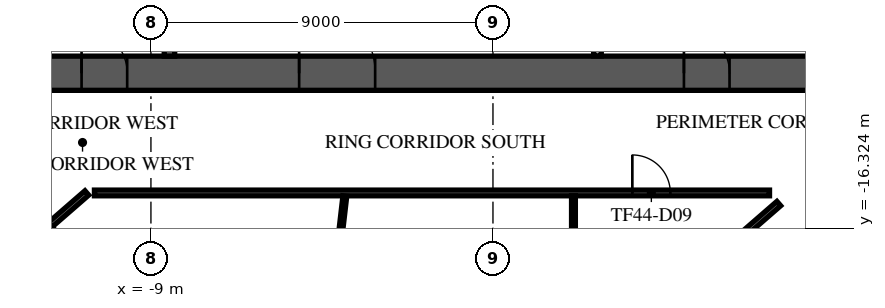
"""IFC4 building model, lengths in metres.
Left out: names, types, materials, properties, quantities, classifications, styles, units other than length and angle.
Written with IfcOpenShell. Run it as: python <this file> out.ifc"""

import sys

from ifc_helpers import new_model, si_unit, direction, frame, frame_2d, origin, place, context, subcontext, project, spatial, rectangle, extrude, element, fill, save


model = new_model("IFC4")
c1 = context("Model", 3, precision=1e-05, world=origin(), true_north=direction((0.0, 1.0)))
c2 = subcontext(c1, "Body", "Model", "MODEL_VIEW")
j1 = project(units=[si_unit("LENGTHUNIT", "METRE"), si_unit("PLANEANGLEUNIT", "RADIAN")], contexts=[c1])
p1 = place(None, origin())
s1 = spatial("IfcSite", under=j1, at=p1, CompositionType="ELEMENT")
p2 = place(p1, origin())
s2 = spatial("IfcBuilding", under=s1, at=p2, CompositionType="ELEMENT")
p3 = place(p2, frame((0.0, 0.0, 193.3)))
s3 = spatial("IfcBuildingStorey", under=s2, at=p3, CompositionType="ELEMENT", Elevation=193.3)
p4 = place(p3, frame((-12.7, -12.25, 0.0), z_axis=(0.0, 0.0, 1.0), x_axis=(1.0, 0.0, 0.0)))
e1 = element("IfcWall", 1, at=p4, inside=s3, PredefinedType="SHEAR", context=c2, shape_type="SweptSolid", body=[
    extrude(rectangle(XDim=25.4, YDim=0.9, at=frame_2d((12.7, 0.0))), origin(), (0.0, 0.0, 1.0), 3.62),
])
p5 = place(p4, frame((7.6, 0.0, 0.0)))
e2 = element("IfcOpeningElement", 2, at=p5, cuts=e1, PredefinedType="OPENING", context=c2, shape_type="SweptSolid", body=[
    extrude(rectangle(XDim=2.0, YDim=2.1, at=frame_2d((1.0, 1.05))), frame((0.0, 0.46, 0.0), z_axis=(0.0, -1.0, 0.0), x_axis=(1.0, 0.0, 0.0)), (0.0, 0.0, 1.0), 0.92),
])
p6 = place(p4, frame((17.725, 0.0, 0.0)))
e3 = element("IfcOpeningElement", 3, at=p6, cuts=e1, PredefinedType="OPENING", context=c2, shape_type="SweptSolid", body=[
    extrude(rectangle(XDim=1.2, YDim=2.1, at=frame_2d((0.6, 1.05))), frame((0.0, 0.46, 0.0), z_axis=(0.0, -1.0, 0.0), x_axis=(1.0, 0.0, 0.0)), (0.0, 0.0, 1.0), 0.92),
])
p7 = place(p4, frame((1.875, 0.0, 0.0)))
e4 = element("IfcOpeningElement", 4, at=p7, cuts=e1, PredefinedType="OPENING", context=c2, shape_type="SweptSolid", body=[
    extrude(rectangle(XDim=1.2, YDim=2.1, at=frame_2d((0.6, 1.05))), frame((0.0, 0.46, 0.0), z_axis=(0.0, -1.0, 0.0), x_axis=(1.0, 0.0, 0.0)), (0.0, 0.0, 1.0), 0.92),
])
p8 = place(p4, frame((22.325, 0.0, 0.0)))
e5 = element("IfcOpeningElement", 5, at=p8, cuts=e1, PredefinedType="OPENING", context=c2, shape_type="SweptSolid", body=[
    extrude(rectangle(XDim=1.2, YDim=2.1, at=frame_2d((0.6, 1.05))), frame((0.0, 0.46, 0.0), z_axis=(0.0, -1.0, 0.0), x_axis=(1.0, 0.0, 0.0)), (0.0, 0.0, 1.0), 0.92),
])
p9 = place(p3, frame((-8.512, -4.55, 0.0), z_axis=(0.0, 0.0, 1.0), x_axis=(0.0, -1.0, 0.0)))
e6 = element("IfcWall", 6, at=p9, inside=s3, PredefinedType="SOLIDWALL", context=c2, shape_type="SweptSolid", body=[
    extrude(rectangle(XDim=7.25, YDim=0.275, at=frame_2d((3.625, 0.0))), origin(), (0.0, 0.0, 1.0), 3.62),
])
p10 = place(p9, frame((6.0, 0.0, 0.0)))
e7 = element("IfcOpeningElement", 7, at=p10, cuts=e6, PredefinedType="OPENING", context=c2, shape_type="SweptSolid", body=[
    extrude(rectangle(XDim=1.0, YDim=2.1, at=frame_2d((0.5, 1.05))), frame((0.0, 0.147, 0.0), z_axis=(0.0, -1.0, 0.0), x_axis=(1.0, 0.0, 0.0)), (0.0, 0.0, 1.0), 0.295),
])
p11 = place(p3, frame((2.75, -11.795, 0.0), z_axis=(0.0, 0.0, 1.0), x_axis=(0.0, 1.0, 0.0)))
e8 = element("IfcWall", 8, at=p11, inside=s3, PredefinedType="PARTITIONING", context=c2, shape_type="SweptSolid", body=[
    extrude(rectangle(XDim=2.99, YDim=0.2, at=frame_2d((1.495, 0.0))), origin(), (0.0, 0.0, 1.0), 3.62),
])
p12 = place(p3, frame((-35.208, -4.768, 0.0), z_axis=(0.0, 0.0, 1.0), x_axis=(0.656058749455, -0.754709823219, 0.0)))
e9 = element("IfcWall", 9, at=p12, inside=s3, PredefinedType="STANDARD", context=c2, shape_type="SweptSolid", body=[
    extrude(rectangle(XDim=39.0, YDim=0.6, at=frame_2d((19.5, 0.0))), origin(), (0.0, 0.0, 1.0), 3.62),
])
p13 = place(p12, frame((1.217, 0.0, 0.9)))
e10 = element("IfcOpeningElement", 10, at=p13, cuts=e9, PredefinedType="OPENING", context=c2, shape_type="SweptSolid", body=[
    extrude(rectangle(XDim=1.9, YDim=2.1, at=frame_2d((0.95, 1.05))), frame((0.0, 0.31, 0.0), z_axis=(0.0, -1.0, 0.0), x_axis=(1.0, 0.0, 0.0)), (0.0, 0.0, 1.0), 0.62),
])
p14 = place(p12, frame((5.55, 0.0, 0.9)))
e11 = element("IfcOpeningElement", 11, at=p14, cuts=e9, PredefinedType="OPENING", context=c2, shape_type="SweptSolid", body=[
    extrude(rectangle(XDim=1.9, YDim=2.1, at=frame_2d((0.95, 1.05))), frame((0.0, 0.31, 0.0), z_axis=(0.0, -1.0, 0.0), x_axis=(1.0, 0.0, 0.0)), (0.0, 0.0, 1.0), 0.62),
])
p15 = place(p12, frame((9.883, 0.0, 0.9)))
e12 = element("IfcOpeningElement", 12, at=p15, cuts=e9, PredefinedType="OPENING", context=c2, shape_type="SweptSolid", body=[
    extrude(rectangle(XDim=1.9, YDim=2.1, at=frame_2d((0.95, 1.05))), frame((0.0, 0.31, 0.0), z_axis=(0.0, -1.0, 0.0), x_axis=(1.0, 0.0, 0.0)), (0.0, 0.0, 1.0), 0.62),
])
p16 = place(p12, frame((14.217, 0.0, 0.9)))
e13 = element("IfcOpeningElement", 13, at=p16, cuts=e9, PredefinedType="OPENING", context=c2, shape_type="SweptSolid", body=[
    extrude(rectangle(XDim=1.9, YDim=2.1, at=frame_2d((0.95, 1.05))), frame((0.0, 0.31, 0.0), z_axis=(0.0, -1.0, 0.0), x_axis=(1.0, 0.0, 0.0)), (0.0, 0.0, 1.0), 0.62),
])
p17 = place(p12, frame((18.55, 0.0, 0.9)))
e14 = element("IfcOpeningElement", 14, at=p17, cuts=e9, PredefinedType="OPENING", context=c2, shape_type="SweptSolid", body=[
    extrude(rectangle(XDim=1.9, YDim=2.1, at=frame_2d((0.95, 1.05))), frame((0.0, 0.31, 0.0), z_axis=(0.0, -1.0, 0.0), x_axis=(1.0, 0.0, 0.0)), (0.0, 0.0, 1.0), 0.62),
])
p18 = place(p12, frame((22.883, 0.0, 0.9)))
e15 = element("IfcOpeningElement", 15, at=p18, cuts=e9, PredefinedType="OPENING", context=c2, shape_type="SweptSolid", body=[
    extrude(rectangle(XDim=1.9, YDim=2.1, at=frame_2d((0.95, 1.05))), frame((0.0, 0.31, 0.0), z_axis=(0.0, -1.0, 0.0), x_axis=(1.0, 0.0, 0.0)), (0.0, 0.0, 1.0), 0.62),
])
p19 = place(p12, frame((27.217, 0.0, 0.9)))
e16 = element("IfcOpeningElement", 16, at=p19, cuts=e9, PredefinedType="OPENING", context=c2, shape_type="SweptSolid", body=[
    extrude(rectangle(XDim=1.9, YDim=2.1, at=frame_2d((0.95, 1.05))), frame((0.0, 0.31, 0.0), z_axis=(0.0, -1.0, 0.0), x_axis=(1.0, 0.0, 0.0)), (0.0, 0.0, 1.0), 0.62),
])
p20 = place(p12, frame((31.55, 0.0, 0.9)))
e17 = element("IfcOpeningElement", 17, at=p20, cuts=e9, PredefinedType="OPENING", context=c2, shape_type="SweptSolid", body=[
    extrude(rectangle(XDim=1.9, YDim=2.1, at=frame_2d((0.95, 1.05))), frame((0.0, 0.31, 0.0), z_axis=(0.0, -1.0, 0.0), x_axis=(1.0, 0.0, 0.0)), (0.0, 0.0, 1.0), 0.62),
])
p21 = place(p12, frame((35.883, 0.0, 0.9)))
e18 = element("IfcOpeningElement", 18, at=p21, cuts=e9, PredefinedType="OPENING", context=c2, shape_type="SweptSolid", body=[
    extrude(rectangle(XDim=1.9, YDim=2.1, at=frame_2d((0.95, 1.05))), frame((0.0, 0.31, 0.0), z_axis=(0.0, -1.0, 0.0), x_axis=(1.0, 0.0, 0.0)), (0.0, 0.0, 1.0), 0.62),
])
p22 = place(p3, frame((-2.286, -34.715, 0.0), z_axis=(0.0, 0.0, 1.0), x_axis=(0.754708272811, 0.656060532993, 0.0)))
e19 = element("IfcWall", 19, at=p22, inside=s3, PredefinedType="STANDARD", context=c2, shape_type="SweptSolid", body=[
    extrude(rectangle(XDim=49.0, YDim=0.6, at=frame_2d((24.5, 0.0))), origin(), (0.0, 0.0, 1.0), 3.62),
])
p23 = place(p22, frame((1.227, 0.0, 0.9)))
e20 = element("IfcOpeningElement", 20, at=p23, cuts=e19, PredefinedType="OPENING", context=c2, shape_type="SweptSolid", body=[
    extrude(rectangle(XDim=2.0, YDim=2.1, at=frame_2d((1.0, 1.05))), frame((0.0, 0.31, 0.0), z_axis=(0.0, -1.0, 0.0), x_axis=(1.0, 0.0, 0.0)), (0.0, 0.0, 1.0), 0.62),
])
p24 = place(p22, frame((5.682, 0.0, 0.9)))
e21 = element("IfcOpeningElement", 21, at=p24, cuts=e19, PredefinedType="OPENING", context=c2, shape_type="SweptSolid", body=[
    extrude(rectangle(XDim=2.0, YDim=2.1, at=frame_2d((1.0, 1.05))), frame((0.0, 0.31, 0.0), z_axis=(0.0, -1.0, 0.0), x_axis=(1.0, 0.0, 0.0)), (0.0, 0.0, 1.0), 0.62),
])
p25 = place(p22, frame((10.136, 0.0, 0.9)))
e22 = element("IfcOpeningElement", 22, at=p25, cuts=e19, PredefinedType="OPENING", context=c2, shape_type="SweptSolid", body=[
    extrude(rectangle(XDim=2.0, YDim=2.1, at=frame_2d((1.0, 1.05))), frame((0.0, 0.31, 0.0), z_axis=(0.0, -1.0, 0.0), x_axis=(1.0, 0.0, 0.0)), (0.0, 0.0, 1.0), 0.62),
])
p26 = place(p22, frame((14.591, 0.0, 0.9)))
e23 = element("IfcOpeningElement", 23, at=p26, cuts=e19, PredefinedType="OPENING", context=c2, shape_type="SweptSolid", body=[
    extrude(rectangle(XDim=2.0, YDim=2.1, at=frame_2d((1.0, 1.05))), frame((0.0, 0.31, 0.0), z_axis=(0.0, -1.0, 0.0), x_axis=(1.0, 0.0, 0.0)), (0.0, 0.0, 1.0), 0.62),
])
p27 = place(p22, frame((19.045, 0.0, 0.9)))
e24 = element("IfcOpeningElement", 24, at=p27, cuts=e19, PredefinedType="OPENING", context=c2, shape_type="SweptSolid", body=[
    extrude(rectangle(XDim=2.0, YDim=2.1, at=frame_2d((1.0, 1.05))), frame((0.0, 0.31, 0.0), z_axis=(0.0, -1.0, 0.0), x_axis=(1.0, 0.0, 0.0)), (0.0, 0.0, 1.0), 0.62),
])
p28 = place(p22, frame((23.5, 0.0, 0.9)))
e25 = element("IfcOpeningElement", 25, at=p28, cuts=e19, PredefinedType="OPENING", context=c2, shape_type="SweptSolid", body=[
    extrude(rectangle(XDim=2.0, YDim=2.1, at=frame_2d((1.0, 1.05))), frame((0.0, 0.31, 0.0), z_axis=(0.0, -1.0, 0.0), x_axis=(1.0, 0.0, 0.0)), (0.0, 0.0, 1.0), 0.62),
])
p29 = place(p22, frame((27.955, 0.0, 0.9)))
e26 = element("IfcOpeningElement", 26, at=p29, cuts=e19, PredefinedType="OPENING", context=c2, shape_type="SweptSolid", body=[
    extrude(rectangle(XDim=2.0, YDim=2.1, at=frame_2d((1.0, 1.05))), frame((0.0, 0.31, 0.0), z_axis=(0.0, -1.0, 0.0), x_axis=(1.0, 0.0, 0.0)), (0.0, 0.0, 1.0), 0.62),
])
p30 = place(p22, frame((32.409, 0.0, 0.9)))
e27 = element("IfcOpeningElement", 27, at=p30, cuts=e19, PredefinedType="OPENING", context=c2, shape_type="SweptSolid", body=[
    extrude(rectangle(XDim=2.0, YDim=2.1, at=frame_2d((1.0, 1.05))), frame((0.0, 0.31, 0.0), z_axis=(0.0, -1.0, 0.0), x_axis=(1.0, 0.0, 0.0)), (0.0, 0.0, 1.0), 0.62),
])
p31 = place(p22, frame((36.864, 0.0, 0.9)))
e28 = element("IfcOpeningElement", 28, at=p31, cuts=e19, PredefinedType="OPENING", context=c2, shape_type="SweptSolid", body=[
    extrude(rectangle(XDim=2.0, YDim=2.1, at=frame_2d((1.0, 1.05))), frame((0.0, 0.31, 0.0), z_axis=(0.0, -1.0, 0.0), x_axis=(1.0, 0.0, 0.0)), (0.0, 0.0, 1.0), 0.62),
])
p32 = place(p22, frame((41.318, 0.0, 0.9)))
e29 = element("IfcOpeningElement", 29, at=p32, cuts=e19, PredefinedType="OPENING", context=c2, shape_type="SweptSolid", body=[
    extrude(rectangle(XDim=2.0, YDim=2.1, at=frame_2d((1.0, 1.05))), frame((0.0, 0.31, 0.0), z_axis=(0.0, -1.0, 0.0), x_axis=(1.0, 0.0, 0.0)), (0.0, 0.0, 1.0), 0.62),
])
p33 = place(p22, frame((45.773, 0.0, 0.9)))
e30 = element("IfcOpeningElement", 30, at=p33, cuts=e19, PredefinedType="OPENING", context=c2, shape_type="SweptSolid", body=[
    extrude(rectangle(XDim=2.0, YDim=2.1, at=frame_2d((1.0, 1.05))), frame((0.0, 0.31, 0.0), z_axis=(0.0, -1.0, 0.0), x_axis=(1.0, 0.0, 0.0)), (0.0, 0.0, 1.0), 0.62),
])
p34 = place(p3, frame((-24.98, -4.673, 0.0), z_axis=(0.0, 0.0, 1.0), x_axis=(0.656048444225, -0.754718781289, 0.0)))
e31 = element("IfcWall", 31, at=p34, inside=s3, PredefinedType="PARTITIONING", context=c2, shape_type="SweptSolid", body=[
    extrude(rectangle(XDim=25.8, YDim=0.15, at=frame_2d((12.9, 0.0))), origin(), (0.0, 0.0, 1.0), 3.17),
])
p35 = place(p34, frame((12.071, 0.0, 0.0)))
e32 = element("IfcOpeningElement", 32, at=p35, cuts=e31, PredefinedType="OPENING", context=c2, shape_type="SweptSolid", body=[
    extrude(rectangle(XDim=1.0, YDim=2.1, at=frame_2d((0.5, 1.05))), frame((0.0, 0.085, 0.0), z_axis=(0.0, -1.0, 0.0), x_axis=(1.0, 0.0, 0.0)), (0.0, 0.0, 1.0), 0.17),
])
p36 = place(p34, frame((24.318, 0.0, 0.0)))
e33 = element("IfcOpeningElement", 33, at=p36, cuts=e31, PredefinedType="OPENING", context=c2, shape_type="SweptSolid", body=[
    extrude(rectangle(XDim=1.0, YDim=2.1, at=frame_2d((0.5, 1.05))), frame((0.0, 0.085, 0.0), z_axis=(0.0, -1.0, 0.0), x_axis=(1.0, 0.0, 0.0)), (0.0, 0.0, 1.0), 0.17),
])
p37 = place(p3, frame((-11.705, -16.285, 0.0), z_axis=(0.0, 0.0, 1.0), x_axis=(0.656018266208, -0.754745012837, 0.0)))
e34 = element("IfcWall", 34, at=p37, inside=s3, PredefinedType="PARTITIONING", context=c2, shape_type="SweptSolid", body=[
    extrude(rectangle(XDim=8.326, YDim=0.15, at=frame_2d((4.163, 0.0))), origin(), (0.0, 0.0, 1.0), 3.17),
])
p38 = place(p3, frame((-11.648, -16.236, 0.0), z_axis=(0.0, 0.0, 1.0), x_axis=(0.754638525281, 0.656140759412, 0.0)))
e35 = element("IfcWall", 35, at=p38, inside=s3, PredefinedType="PARTITIONING", context=c2, shape_type="SweptSolid", body=[
    extrude(rectangle(XDim=1.274, YDim=0.15, at=frame_2d((0.637, 0.0))), origin(), (0.0, 0.0, 1.0), 3.17),
])
p39 = place(p3, frame((-10.486, -15.4, 0.0), z_axis=(0.0, 0.0, 1.0), x_axis=(1.0, 0.0, 0.0)))
e36 = element("IfcWall", 36, at=p39, inside=s3, PredefinedType="PARTITIONING", context=c2, shape_type="SweptSolid", body=[
    extrude(rectangle(XDim=17.763, YDim=0.15, at=frame_2d((8.882, 0.0))), origin(), (0.0, 0.0, 1.0), 3.17),
])
p40 = place(p39, frame((14.154, 0.0, 0.0)))
e37 = element("IfcOpeningElement", 37, at=p40, cuts=e36, PredefinedType="OPENING", context=c2, shape_type="SweptSolid", body=[
    extrude(rectangle(XDim=1.0, YDim=2.1, at=frame_2d((0.5, 1.05))), frame((0.0, 0.085, 0.0), z_axis=(0.0, -1.0, 0.0), x_axis=(1.0, 0.0, 0.0)), (0.0, 0.0, 1.0), 0.17),
])
p41 = place(p3, frame((-2.631, -24.505, 0.0), z_axis=(0.0, 0.0, 1.0), x_axis=(0.754714526528, 0.656053338874, 0.0)))
e38 = element("IfcWall", 38, at=p41, inside=s3, PredefinedType="PARTITIONING", context=c2, shape_type="SweptSolid", body=[
    extrude(rectangle(XDim=13.452, YDim=0.15, at=frame_2d((6.726, 0.0))), origin(), (0.0, 0.0, 1.0), 3.17),
])
p42 = place(p41, frame((3.05, 0.0, 0.0)))
e39 = element("IfcOpeningElement", 39, at=p42, cuts=e38, PredefinedType="OPENING", context=c2, shape_type="SweptSolid", body=[
    extrude(rectangle(XDim=1.0, YDim=2.1, at=frame_2d((0.5, 1.05))), frame((0.0, 0.085, 0.0), z_axis=(0.0, -1.0, 0.0), x_axis=(1.0, 0.0, 0.0)), (0.0, 0.0, 1.0), 0.17),
])
p43 = place(p3, frame((-1.0, -26.268, 0.0), z_axis=(0.0, 0.0, 1.0), x_axis=(0.754711356604, 0.656056985492, 0.0)))
e40 = element("IfcWall", 40, at=p43, inside=s3, PredefinedType="PARTITIONING", context=c2, shape_type="SweptSolid", body=[
    extrude(rectangle(XDim=36.052, YDim=0.15, at=frame_2d((18.026, 0.0))), origin(), (0.0, 0.0, 1.0), 3.17),
])
p44 = place(p43, frame((9.598, 0.0, 0.0)))
e41 = element("IfcOpeningElement", 41, at=p44, cuts=e40, PredefinedType="OPENING", context=c2, shape_type="SweptSolid", body=[
    extrude(rectangle(XDim=1.0, YDim=2.1, at=frame_2d((0.5, 1.05))), frame((0.0, 0.085, 0.0), z_axis=(0.0, -1.0, 0.0), x_axis=(1.0, 0.0, 0.0)), (0.0, 0.0, 1.0), 0.17),
])
p45 = place(p43, frame((20.957, 0.0, 0.0)))
e42 = element("IfcOpeningElement", 42, at=p45, cuts=e40, PredefinedType="OPENING", context=c2, shape_type="SweptSolid", body=[
    extrude(rectangle(XDim=1.0, YDim=2.1, at=frame_2d((0.5, 1.05))), frame((0.0, 0.085, 0.0), z_axis=(0.0, -1.0, 0.0), x_axis=(1.0, 0.0, 0.0)), (0.0, 0.0, 1.0), 0.17),
])
p46 = place(p43, frame((27.87, 0.0, 0.0)))
e43 = element("IfcOpeningElement", 43, at=p46, cuts=e40, PredefinedType="OPENING", context=c2, shape_type="SweptSolid", body=[
    extrude(rectangle(XDim=1.8, YDim=2.1, at=frame_2d((0.9, 1.05))), frame((0.0, 0.085, 0.0), z_axis=(0.0, -1.0, 0.0), x_axis=(1.0, 0.0, 0.0)), (0.0, 0.0, 1.0), 0.17),
])
p47 = place(p3, frame((-5.674, -30.833, 0.0), z_axis=(0.0, 0.0, 1.0), x_axis=(0.114957483757, 0.993370412751, 0.0)))
e44 = element("IfcWall", 44, at=p47, inside=s3, PredefinedType="PARTITIONING", context=c2, shape_type="SweptSolid", body=[
    extrude(rectangle(XDim=15.455, YDim=0.1, at=frame_2d((7.727, 0.0))), origin(), (0.0, 0.0, 1.0), 3.62),
])
p48 = place(p3, frame((2.118, -20.234, 0.0), z_axis=(0.0, 0.0, 1.0), x_axis=(0.0, 1.0, 0.0)))
e45 = element("IfcWall", 45, at=p48, inside=s3, PredefinedType="PARTITIONING", context=c2, shape_type="SweptSolid", body=[
    extrude(rectangle(XDim=4.759, YDim=0.1, at=frame_2d((2.379, 0.0))), origin(), (0.0, 0.0, 1.0), 3.17),
])
p49 = place(p5, origin())
e46 = element("IfcDoor", 46, at=p49, inside=s3, OperationType="SINGLE_SWING_LEFT", PredefinedType="DOOR", context=c2, shape_type="SweptSolid", body=[
    extrude(rectangle(XDim=2.0, YDim=2.1, at=frame_2d((1.0, 1.05))), frame((0.0, 0.025, 0.0), z_axis=(0.0, -1.0, 0.0), x_axis=(1.0, 0.0, 0.0)), (0.0, 0.0, 1.0), 0.05),
])
fill(e2, e46)
p50 = place(p6, origin())
e47 = element("IfcDoor", 47, at=p50, inside=s3, OperationType="SINGLE_SWING_LEFT", PredefinedType="DOOR", context=c2, shape_type="SweptSolid", body=[
    extrude(rectangle(XDim=1.2, YDim=2.1, at=frame_2d((0.6, 1.05))), frame((0.0, 0.025, 0.0), z_axis=(0.0, -1.0, 0.0), x_axis=(1.0, 0.0, 0.0)), (0.0, 0.0, 1.0), 0.05),
])
fill(e3, e47)
p51 = place(p7, origin())
e48 = element("IfcDoor", 48, at=p51, inside=s3, OperationType="SINGLE_SWING_LEFT", PredefinedType="DOOR", context=c2, shape_type="SweptSolid", body=[
    extrude(rectangle(XDim=1.2, YDim=2.1, at=frame_2d((0.6, 1.05))), frame((0.0, 0.025, 0.0), z_axis=(0.0, -1.0, 0.0), x_axis=(1.0, 0.0, 0.0)), (0.0, 0.0, 1.0), 0.05),
])
fill(e4, e48)
p52 = place(p40, frame((1.0, 0.0, 0.0), z_axis=(0.0, 0.0, 1.0), x_axis=(-1.0, 0.0, 0.0)))
e49 = element("IfcDoor", 49, at=p52, inside=s3, OperationType="SINGLE_SWING_LEFT", PredefinedType="DOOR", context=c2, shape_type="SweptSolid", body=[
    extrude(rectangle(XDim=1.0, YDim=2.1, at=frame_2d((0.5, 1.05))), frame((0.0, 0.025, 0.0), z_axis=(0.0, -1.0, 0.0), x_axis=(1.0, 0.0, 0.0)), (0.0, 0.0, 1.0), 0.05),
])
fill(e37, e49)
save(model, sys.argv[1])
